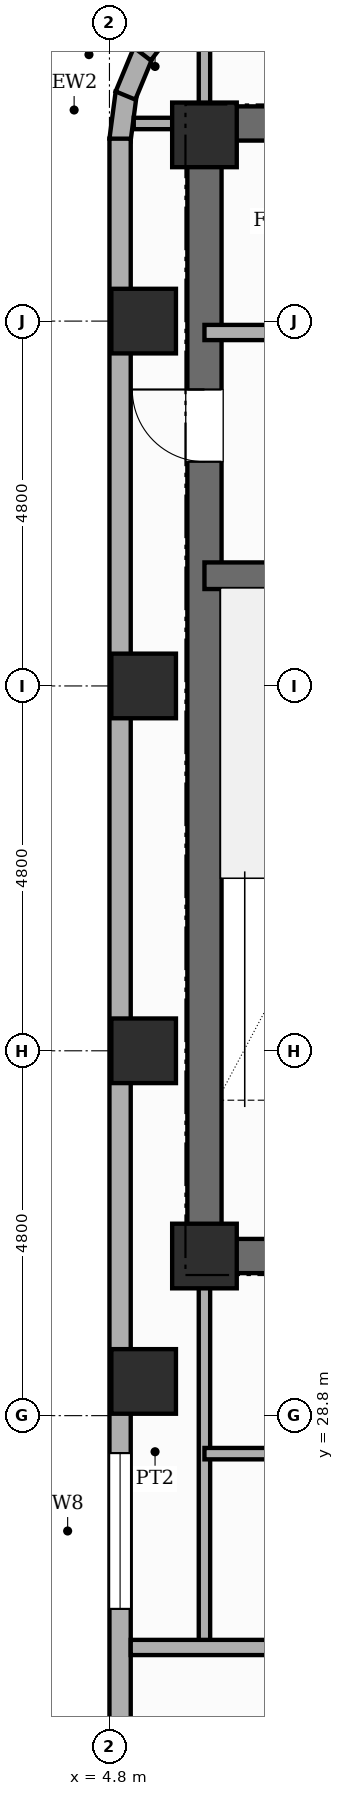
"""IFC4 building model, lengths in metres.
Left out: names, types, materials, properties, quantities, classifications, styles, units other than length and angle.
Written with IfcOpenShell. Run it as: python <this file> out.ifc"""

import sys

from ifc_helpers import new_model, si_unit, direction, frame, frame_2d, origin, origin_2d, place, context, subcontext, project, spatial, rectangle, extrude, element, fill, save


model = new_model("IFC4")
c1 = context("Model", 3, precision=1e-05, world=origin(), true_north=direction((0.0, 1.0)))
c2 = subcontext(c1, "Body", "Model", "MODEL_VIEW")
j1 = project(units=[si_unit("LENGTHUNIT", "METRE"), si_unit("PLANEANGLEUNIT", "RADIAN")], contexts=[c1])
p1 = place(None, origin())
s1 = spatial("IfcSite", under=j1, at=p1, CompositionType="ELEMENT")
p2 = place(p1, origin())
s2 = spatial("IfcBuilding", under=s1, at=p2, CompositionType="ELEMENT")
p3 = place(p2, frame((0.0, 0.0, 239.8)))
s3 = spatial("IfcBuildingStorey", under=s2, at=p3, CompositionType="ELEMENT", Elevation=239.8)
p4 = place(p3, frame((6.05, 30.675, 0.0), z_axis=(0.0, 0.0, 1.0), x_axis=(0.0, 1.0, 0.0)))
e1 = element("IfcWall", 1, at=p4, inside=s3, PredefinedType="SHEAR", context=c2, shape_type="SweptSolid", body=[
    extrude(rectangle(XDim=15.35, YDim=0.45, at=frame_2d((7.675, 0.0))), origin(), (0.0, 0.0, 1.0), 4.3),
])
p5 = place(p4, frame((10.675, 0.0, 0.0)))
e2 = element("IfcOpeningElement", 2, at=p5, cuts=e1, PredefinedType="OPENING", context=c2, shape_type="SweptSolid", body=[
    extrude(rectangle(XDim=0.95, YDim=2.15, at=frame_2d((0.475, 1.075))), frame((0.0, 0.235, 0.0), z_axis=(0.0, -1.0, 0.0), x_axis=(1.0, 0.0, 0.0)), (0.0, 0.0, 1.0), 0.47),
])
p6 = place(p3, frame((6.05, 45.8, 0.0), z_axis=(0.0, 0.0, 1.0), x_axis=(1.0, 0.0, 0.0)))
e3 = element("IfcWall", 3, at=p6, inside=s3, PredefinedType="SHEAR", context=c2, shape_type="SweptSolid", body=[
    extrude(rectangle(XDim=16.7, YDim=0.45, at=frame_2d((8.35, 0.0))), origin(), (0.0, 0.0, 1.0), 4.3),
])
p7 = place(p6, frame((13.57, 0.0, 0.0)))
e4 = element("IfcOpeningElement", 4, at=p7, cuts=e3, PredefinedType="OPENING", context=c2, shape_type="SweptSolid", body=[
    extrude(rectangle(XDim=0.95, YDim=2.15, at=frame_2d((0.475, 1.075))), frame((0.0, 0.235, 0.0), z_axis=(0.0, -1.0, 0.0), x_axis=(1.0, 0.0, 0.0)), (0.0, 0.0, 1.0), 0.47),
])
p8 = place(p3, frame((6.05, 30.9, 0.0), z_axis=(0.0, 0.0, 1.0), x_axis=(1.0, 0.0, 0.0)))
e5 = element("IfcWall", 5, at=p8, inside=s3, PredefinedType="SHEAR", context=c2, shape_type="SweptSolid", body=[
    extrude(rectangle(XDim=3.91, YDim=0.45, at=frame_2d((1.955, 0.0))), origin(), (0.0, 0.0, 1.0), 4.3),
])
p9 = place(p3, frame((6.05, 39.85, 0.0), z_axis=(0.0, 0.0, 1.0), x_axis=(1.0, 0.0, 0.0)))
e6 = element("IfcWall", 6, at=p9, inside=s3, PredefinedType="SHEAR", context=c2, shape_type="SweptSolid", body=[
    extrude(rectangle(XDim=3.91, YDim=0.35, at=frame_2d((1.955, 0.0))), origin(), (0.0, 0.0, 1.0), 4.3),
])
for number, where, z_axis, x_axis in (
    (7, (5.25, 29.25, 0.0), (0.0, 0.0, 1.0), (1.0, 0.0, 0.0)),
    (8, (5.25, 33.6, 0.0), (0.0, 0.0, 1.0), (1.0, 0.0, 0.0)),
    (9, (5.25, 38.4, 0.0), (0.0, 0.0, 1.0), (1.0, 0.0, 0.0)),
    (10, (5.25, 43.2, 0.0), (0.0, 0.0, 1.0), (1.0, 0.0, 0.0)),
    (11, (6.05, 30.9, 0.0), (0.0, 0.0, 1.0), (1.0, 0.0, 0.0)),
    (12, (6.05, 45.65, 0.0), (0.0, 0.0, 1.0), (1.0, 0.0, 0.0)),
):
    element("IfcColumn", number, at=place(p3, frame(where, z_axis=z_axis, x_axis=x_axis)), inside=s3, PredefinedType="COLUMN", context=c2, shape_type="SweptSolid", body=[
        extrude(rectangle(XDim=0.85, YDim=0.85, at=origin_2d()), origin(), (0.0, 0.0, 1.0), 4.3),
    ])
for number, where, z_axis, x_axis in (
    (13, (4.939, 45.582, 0.0), (0.0, 0.0, 1.0), (0.131, 0.991, 0.0)),
    (14, (5.011, 46.167, 0.0), (0.0, 0.0, 1.0), (0.383, 0.924, 0.0)),
    (15, (5.233, 46.715, 0.0), (0.0, 0.0, 1.0), (0.609, 0.793, 0.0)),
):
    element("IfcWall", number, at=place(p3, frame(where, z_axis=z_axis, x_axis=x_axis)), inside=s3, PredefinedType="STANDARD", context=c2, shape_type="SweptSolid", body=[
        extrude(rectangle(XDim=0.626, YDim=0.28, at=frame_2d((0.313, 0.0))), origin(), (0.0, 0.0, 1.0), 4.04),
    ])
p10 = place(p3, frame((4.94, 12.0, 0.0), z_axis=(0.0, 0.0, 1.0), x_axis=(0.0, 1.0, 0.0)))
e16 = element("IfcWall", 16, at=p10, inside=s3, PredefinedType="STANDARD", context=c2, shape_type="SweptSolid", body=[
    extrude(rectangle(XDim=33.6, YDim=0.28, at=frame_2d((16.8, 0.0))), origin(), (0.0, 0.0, 1.0), 3.32),
])
p11 = place(p10, frame((4.25, 0.0, 0.0)))
e17 = element("IfcOpeningElement", 17, at=p11, cuts=e16, PredefinedType="OPENING", context=c2, shape_type="SweptSolid", body=[
    extrude(rectangle(XDim=1.1, YDim=2.15, at=frame_2d((0.55, 1.075))), frame((0.0, 0.15, 0.0), z_axis=(0.0, -1.0, 0.0), x_axis=(1.0, 0.0, 0.0)), (0.0, 0.0, 1.0), 0.3),
])
p12 = place(p10, frame((0.355, 0.0, 0.8)))
e18 = element("IfcOpeningElement", 18, at=p12, cuts=e16, PredefinedType="OPENING", context=c2, shape_type="SweptSolid", body=[
    extrude(rectangle(XDim=0.95, YDim=1.8, at=frame_2d((0.475, 0.9))), frame((0.0, 0.15, 0.0), z_axis=(0.0, -1.0, 0.0), x_axis=(1.0, 0.0, 0.0)), (0.0, 0.0, 1.0), 0.3),
])
p13 = place(p10, frame((3.123, 0.0, 0.45)))
e19 = element("IfcOpeningElement", 19, at=p13, cuts=e16, PredefinedType="OPENING", context=c2, shape_type="SweptSolid", body=[
    extrude(rectangle(XDim=0.75, YDim=1.8, at=frame_2d((0.375, 0.9))), frame((0.0, 0.15, 0.0), z_axis=(0.0, -1.0, 0.0), x_axis=(1.0, 0.0, 0.0)), (0.0, 0.0, 1.0), 0.3),
])
p14 = place(p10, frame((5.802, 0.0, 0.45)))
e20 = element("IfcOpeningElement", 20, at=p14, cuts=e16, PredefinedType="OPENING", context=c2, shape_type="SweptSolid", body=[
    extrude(rectangle(XDim=0.75, YDim=1.8, at=frame_2d((0.375, 0.9))), frame((0.0, 0.15, 0.0), z_axis=(0.0, -1.0, 0.0), x_axis=(1.0, 0.0, 0.0)), (0.0, 0.0, 1.0), 0.3),
])
p15 = place(p10, frame((9.978, 0.0, 0.8)))
e21 = element("IfcOpeningElement", 21, at=p15, cuts=e16, PredefinedType="OPENING", context=c2, shape_type="SweptSolid", body=[
    extrude(rectangle(XDim=1.2, YDim=1.8, at=frame_2d((0.6, 0.9))), frame((0.0, 0.15, 0.0), z_axis=(0.0, -1.0, 0.0), x_axis=(1.0, 0.0, 0.0)), (0.0, 0.0, 1.0), 0.3),
])
p16 = place(p10, frame((14.258, 0.0, 0.8)))
e22 = element("IfcOpeningElement", 22, at=p16, cuts=e16, PredefinedType="OPENING", context=c2, shape_type="SweptSolid", body=[
    extrude(rectangle(XDim=2.05, YDim=1.95, at=frame_2d((1.025, 0.975))), frame((0.0, 0.15, 0.0), z_axis=(0.0, -1.0, 0.0), x_axis=(1.0, 0.0, 0.0)), (0.0, 0.0, 1.0), 0.3),
])
p17 = place(p3, frame((6.05, 43.05, 0.0), z_axis=(0.0, 0.0, 1.0), x_axis=(1.0, 0.0, 0.0)))
e23 = element("IfcWall", 23, at=p17, inside=s3, PredefinedType="POLYGONAL", context=c2, shape_type="SweptSolid", body=[
    extrude(rectangle(XDim=3.91, YDim=0.2, at=frame_2d((1.955, 0.0))), origin(), (0.0, 0.0, 1.0), 3.32),
])
p18 = place(p17, frame((1.35, 0.0, 0.0)))
e24 = element("IfcOpeningElement", 24, at=p18, cuts=e23, PredefinedType="OPENING", context=c2, shape_type="SweptSolid", body=[
    extrude(rectangle(XDim=0.88, YDim=2.1, at=frame_2d((0.44, 1.05))), frame((0.0, 0.11, 0.0), z_axis=(0.0, -1.0, 0.0), x_axis=(1.0, 0.0, 0.0)), (0.0, 0.0, 1.0), 0.22),
])
p19 = place(p3, frame((6.05, 25.75, 0.0), z_axis=(0.0, 0.0, 1.0), x_axis=(0.0, 1.0, 0.0)))
e25 = element("IfcWall", 25, at=p19, inside=s3, PredefinedType="PARTITIONING", context=c2, shape_type="SweptSolid", body=[
    extrude(rectangle(XDim=5.15, YDim=0.15, at=frame_2d((2.575, 0.0))), origin(), (0.0, 0.0, 1.0), 4.04),
])
p20 = place(p3, frame((6.05, 28.3, 0.0), z_axis=(0.0, 0.0, 1.0), x_axis=(1.0, 0.0, 0.0)))
e26 = element("IfcWall", 26, at=p20, inside=s3, PredefinedType="PARTITIONING", context=c2, shape_type="SweptSolid", body=[
    extrude(rectangle(XDim=7.55, YDim=0.15, at=frame_2d((3.775, 0.0))), origin(), (0.0, 0.0, 1.0), 4.04),
])
p21 = place(p3, frame((5.08, 25.75, 0.0), z_axis=(0.0, 0.0, 1.0), x_axis=(1.0, 0.0, 0.0)))
e27 = element("IfcWall", 27, at=p21, inside=s3, PredefinedType="PARTITIONING", context=c2, shape_type="SweptSolid", body=[
    extrude(rectangle(XDim=8.52, YDim=0.2, at=frame_2d((4.26, 0.0))), origin(), (0.0, 0.0, 1.0), 4.04),
])
p22 = place(p3, frame((5.12, 45.8, 0.0), z_axis=(0.0, 0.0, 1.0), x_axis=(1.0, 0.0, 0.0)))
e28 = element("IfcWall", 28, at=p22, inside=s3, PredefinedType="PARTITIONING", context=c2, shape_type="SweptSolid", body=[
    extrude(rectangle(XDim=0.93, YDim=0.15, at=frame_2d((0.465, 0.0))), origin(), (0.0, 0.0, 1.0), 4.04),
])
p23 = place(p3, frame((6.05, 45.8, 0.0), z_axis=(0.0, 0.0, 1.0), x_axis=(0.0, 1.0, 0.0)))
e29 = element("IfcWall", 29, at=p23, inside=s3, PredefinedType="PARTITIONING", context=c2, shape_type="SweptSolid", body=[
    extrude(rectangle(XDim=1.5, YDim=0.15, at=frame_2d((0.75, 0.0))), origin(), (0.0, 0.0, 1.0), 4.04),
])
p24 = place(p16, origin())
e30 = element("IfcWindow", 30, at=p24, inside=s3, PartitioningType="SINGLE_PANEL", PredefinedType="WINDOW", context=c2, shape_type="SweptSolid", body=[
    extrude(rectangle(XDim=2.05, YDim=1.95, at=frame_2d((1.025, 0.975))), frame((0.0, 0.03, 0.0), z_axis=(0.0, -1.0, 0.0), x_axis=(1.0, 0.0, 0.0)), (0.0, 0.0, 1.0), 0.06),
])
fill(e22, e30)
p25 = place(p5, origin())
e31 = element("IfcDoor", 31, at=p25, inside=s3, OperationType="SINGLE_SWING_RIGHT", PredefinedType="DOOR", context=c2, shape_type="SweptSolid", body=[
    extrude(rectangle(XDim=0.95, YDim=2.15, at=frame_2d((0.475, 1.075))), frame((0.0, 0.025, 0.0), z_axis=(0.0, -1.0, 0.0), x_axis=(1.0, 0.0, 0.0)), (0.0, 0.0, 1.0), 0.05),
])
fill(e2, e31)
save(model, sys.argv[1])
